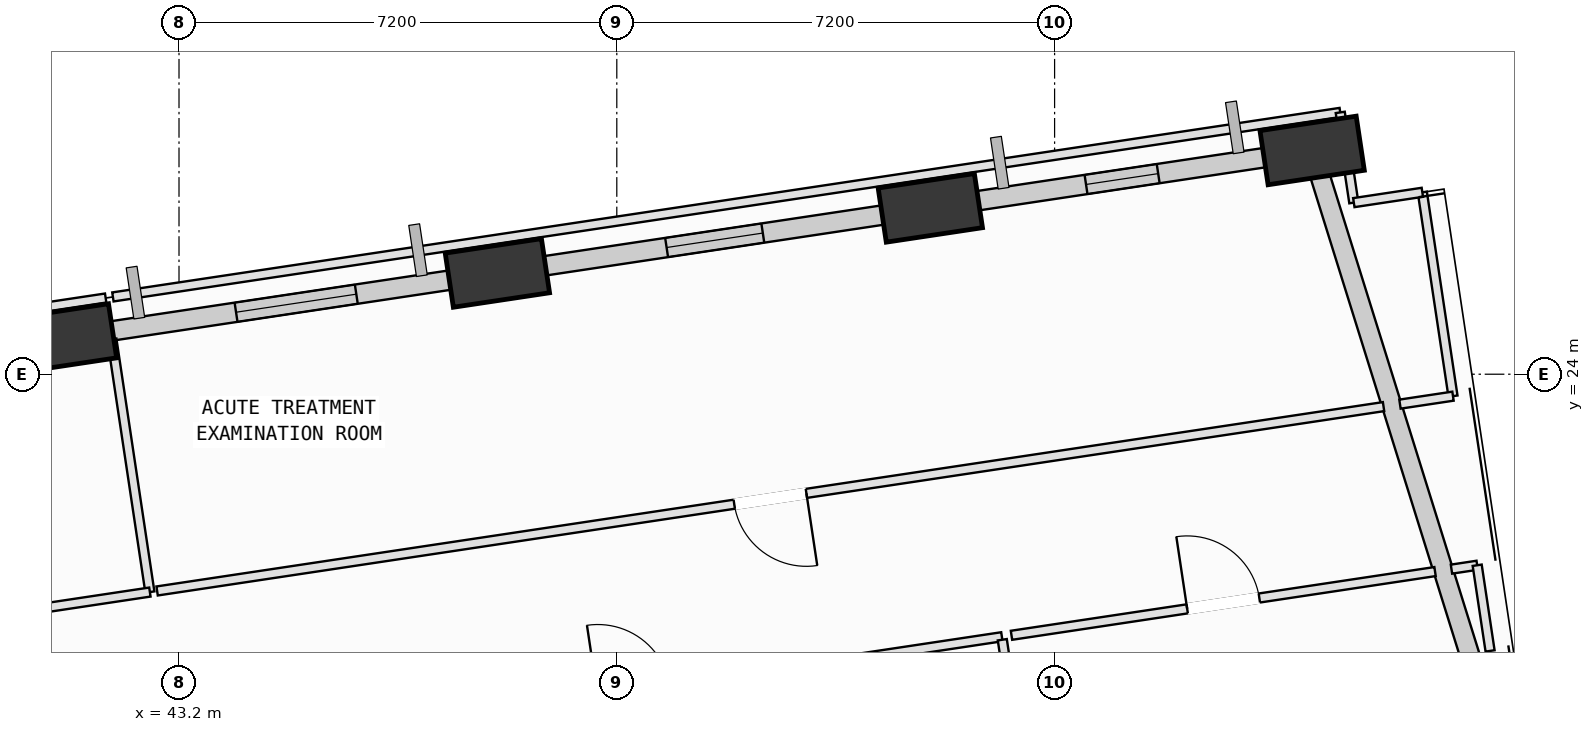
"""IFC4 building model, lengths in metres.
Left out: names, types, materials, properties, quantities, classifications, styles, units other than length and angle.
Written with IfcOpenShell. Run it as: python <this file> out.ifc"""

import sys

from ifc_helpers import new_model, si_unit, direction, frame, frame_2d, origin, origin_2d, place, context, subcontext, project, spatial, rectangle, extrude, element, fill, save


model = new_model("IFC4")
c1 = context("Model", 3, precision=1e-05, world=origin(), true_north=direction((0.0, 1.0)))
c2 = subcontext(c1, "Body", "Model", "MODEL_VIEW")
j1 = project(units=[si_unit("LENGTHUNIT", "METRE"), si_unit("PLANEANGLEUNIT", "RADIAN")], contexts=[c1])
p1 = place(None, origin())
s1 = spatial("IfcSite", under=j1, at=p1, CompositionType="ELEMENT")
p2 = place(p1, origin())
s2 = spatial("IfcBuilding", under=s1, at=p2, CompositionType="ELEMENT")
p3 = place(p2, frame((0.0, 0.0, 59.0)))
s3 = spatial("IfcBuildingStorey", under=s2, at=p3, CompositionType="ELEMENT", Elevation=59.0)
p4 = place(p3, frame((64.761, 18.311, 0.002), z_axis=(0.025557415951, 0.128271580531, 0.991409713548), x_axis=(-0.045765713476, -0.990543708864, 0.129339322325)))
e1 = element("IfcColumn", 1, at=p4, inside=s3, PredefinedType="COLUMN", context=c2, shape_type="SweptSolid", body=[
    extrude(rectangle(XDim=1.6, YDim=0.9, at=origin_2d()), origin(), (0.0, 0.0, 1.0), 4.031),
])
p5 = place(p3, frame((61.836, 27.68, 0.002), z_axis=(-0.012861832175, 0.116120503694, 0.993151852385), x_axis=(-0.966620527466, -0.255622879476, 0.017369495388)))
e2 = element("IfcColumn", 2, at=p5, inside=s3, PredefinedType="COLUMN", context=c2, shape_type="SweptSolid", body=[
    extrude(rectangle(XDim=1.6, YDim=0.9, at=origin_2d()), origin(), (0.0, 0.0, 1.0), 4.024),
])
p6 = place(p3, frame((55.556, 26.736, 0.002), z_axis=(-0.008760077746, 0.090581637247, 0.995850504861), x_axis=(-0.970042481698, -0.242558297354, 0.013529822077)))
e3 = element("IfcColumn", 3, at=p6, inside=s3, PredefinedType="COLUMN", context=c2, shape_type="SweptSolid", body=[
    extrude(rectangle(XDim=1.6, YDim=0.9, at=origin_2d()), origin(), (0.0, 0.0, 1.0), 4.013),
])
p7 = place(p3, frame((48.436, 25.666, 0.002), z_axis=(-0.004085112023, 0.061337652165, 0.998108713661), x_axis=(-0.976839538376, -0.213777892359, 0.00913942032)))
e4 = element("IfcColumn", 4, at=p7, inside=s3, PredefinedType="COLUMN", context=c2, shape_type="SweptSolid", body=[
    extrude(rectangle(XDim=1.6, YDim=0.9, at=origin_2d()), origin(), (0.0, 0.0, 1.0), 4.004),
])
p8 = place(p3, frame((41.316, 24.595, 0.002), z_axis=(0.000610560717, 0.031993381587, 0.999487894249), x_axis=(-0.991541763684, -0.129700801912, 0.00475739999)))
e5 = element("IfcColumn", 5, at=p8, inside=s3, PredefinedType="COLUMN", context=c2, shape_type="SweptSolid", body=[
    extrude(rectangle(XDim=1.6, YDim=0.9, at=origin_2d()), origin(), (0.0, 0.0, 1.0), 3.999),
])
p9 = place(p3, frame((61.948, 27.322, 0.0), z_axis=(0.0, 0.0, 1.0), x_axis=(0.298050664907, -0.954550051673, 0.0)))
e6 = element("IfcWall", 6, at=p9, inside=s3, PredefinedType="SOLIDWALL", context=c2, shape_type="SweptSolid", body=[
    extrude(rectangle(XDim=8.614, YDim=0.32, at=frame_2d((4.307, 0.0))), origin(), (0.0, 0.0, 1.0), 3.165),
])
p10 = place(p3, frame((56.139, 26.823, 0.0), z_axis=(0.0, 0.0, 1.0), x_axis=(0.988887137773, 0.148668183374, 0.0)))
e7 = element("IfcWall", 7, at=p10, inside=s3, PredefinedType="SOLIDWALL", context=c2, shape_type="SweptSolid", body=[
    extrude(rectangle(XDim=5.209, YDim=0.32, at=frame_2d((2.604, 0.0))), origin(), (0.0, 0.0, 1.0), 3.165),
])
p11 = place(p10, frame((2.0, 0.0, 0.75)))
e8 = element("IfcOpeningElement", 8, at=p11, cuts=e7, PredefinedType="OPENING", context=c2, shape_type="SweptSolid", body=[
    extrude(rectangle(XDim=1.2, YDim=1.75, at=frame_2d((0.6, 0.875))), frame((0.0, 0.17, 0.0), z_axis=(0.0, -1.0, 0.0), x_axis=(1.0, 0.0, 0.0)), (0.0, 0.0, 1.0), 0.34),
])
p12 = place(p3, frame((49.035, 25.755, 0.0), z_axis=(0.0, 0.0, 1.0), x_axis=(0.988890529399, 0.148645621746, 0.0)))
e9 = element("IfcWall", 9, at=p12, inside=s3, PredefinedType="SOLIDWALL", context=c2, shape_type="SweptSolid", body=[
    extrude(rectangle(XDim=6.024, YDim=0.32, at=frame_2d((3.012, 0.0))), origin(), (0.0, 0.0, 1.0), 3.165),
])
p13 = place(p12, frame((2.209, 0.0, 0.75)))
e10 = element("IfcOpeningElement", 10, at=p13, cuts=e9, PredefinedType="OPENING", context=c2, shape_type="SweptSolid", body=[
    extrude(rectangle(XDim=1.6, YDim=1.95, at=frame_2d((0.8, 0.975))), frame((0.0, 0.17, 0.0), z_axis=(0.0, -1.0, 0.0), x_axis=(1.0, 0.0, 0.0)), (0.0, 0.0, 1.0), 0.34),
])
p14 = place(p3, frame((41.925, 24.686, 0.0), z_axis=(0.0, 0.0, 1.0), x_axis=(0.988883458741, 0.148692652905, 0.0)))
e11 = element("IfcWall", 11, at=p14, inside=s3, PredefinedType="SOLIDWALL", context=c2, shape_type="SweptSolid", body=[
    extrude(rectangle(XDim=6.0, YDim=0.32, at=frame_2d((3.0, 0.0))), origin(), (0.0, 0.0, 1.0), 3.165),
])
p15 = place(p14, frame((2.238, 0.0, 0.75)))
e12 = element("IfcOpeningElement", 12, at=p15, cuts=e11, PredefinedType="OPENING", context=c2, shape_type="SweptSolid", body=[
    extrude(rectangle(XDim=2.0, YDim=1.95, at=frame_2d((1.0, 0.975))), frame((0.0, 0.17, 0.0), z_axis=(0.0, -1.0, 0.0), x_axis=(1.0, 0.0, 0.0)), (0.0, 0.0, 1.0), 0.34),
])
p16 = place(p3, frame((44.629, 17.863, 0.0), z_axis=(0.0, 0.0, 1.0), x_axis=(0.988897401615, 0.148599895962, 0.0)))
e13 = element("IfcWall", 13, at=p16, inside=s3, PredefinedType="PARTITIONING", context=c2, shape_type="SweptSolid", body=[
    extrude(rectangle(XDim=12.24, YDim=0.15, at=frame_2d((6.12, 0.0))), origin(), (0.0, 0.0, 1.0), 3.78),
])
p17 = place(p16, frame((5.52, 0.0, 0.0)))
e14 = element("IfcOpeningElement", 14, at=p17, cuts=e13, PredefinedType="OPENING", context=c2, shape_type="SweptSolid", body=[
    extrude(rectangle(XDim=1.2, YDim=2.15, at=frame_2d((0.6, 1.075))), frame((0.0, 0.085, 0.0), z_axis=(0.0, -1.0, 0.0), x_axis=(1.0, 0.0, 0.0)), (0.0, 0.0, 1.0), 0.17),
])
p18 = place(p3, frame((56.74, 19.633, 0.0), z_axis=(0.0, 0.0, 1.0), x_axis=(0.148699523168, -0.988882425675, 0.0)))
e15 = element("IfcWall", 15, at=p18, inside=s3, PredefinedType="PARTITIONING", context=c2, shape_type="SweptSolid", body=[
    extrude(rectangle(XDim=13.565, YDim=0.15, at=frame_2d((6.782, 0.0))), origin(), (0.0, 0.0, 1.0), 3.78),
])
p19 = place(p3, frame((56.891, 19.706, 0.0), z_axis=(0.0, 0.0, 1.0), x_axis=(0.988874237146, 0.14875396838, 0.0)))
e16 = element("IfcWall", 16, at=p19, inside=s3, PredefinedType="PARTITIONING", context=c2, shape_type="SweptSolid", body=[
    extrude(rectangle(XDim=7.044, YDim=0.15, at=frame_2d((3.522, 0.0))), origin(), (0.0, 0.0, 1.0), 3.78),
])
p20 = place(p19, frame((2.922, 0.0, 0.0)))
e17 = element("IfcOpeningElement", 17, at=p20, cuts=e16, PredefinedType="OPENING", context=c2, shape_type="SweptSolid", body=[
    extrude(rectangle(XDim=1.2, YDim=2.15, at=frame_2d((0.6, 1.075))), frame((0.0, 0.085, 0.0), z_axis=(0.0, -1.0, 0.0), x_axis=(1.0, 0.0, 0.0)), (0.0, 0.0, 1.0), 0.17),
])
p21 = place(p3, frame((64.127, 20.794, 0.0), z_axis=(0.0, 0.0, 1.0), x_axis=(0.988764107643, 0.149484244779, 0.0)))
e18 = element("IfcWall", 18, at=p21, inside=s3, PredefinedType="PARTITIONING", context=c2, shape_type="SweptSolid", body=[
    extrude(rectangle(XDim=0.428, YDim=0.15, at=frame_2d((0.214, 0.0))), origin(), (0.0, 0.0, 1.0), 3.78),
])
p22 = place(p3, frame((64.55, 20.858, 0.0), z_axis=(0.0, 0.0, 1.0), x_axis=(0.148734259416, -0.988877201717, 0.0)))
e19 = element("IfcWall", 19, at=p22, inside=s3, PredefinedType="PARTITIONING", context=c2, shape_type="SweptSolid", body=[
    extrude(rectangle(XDim=1.425, YDim=0.15, at=frame_2d((0.712, 0.0))), origin(), (0.0, 0.0, 1.0), 3.165),
])
p23 = place(p3, frame((42.096, 24.576, 0.0), z_axis=(0.0, 0.0, 1.0), x_axis=(0.148610121191, -0.988895865033, 0.0)))
e20 = element("IfcWall", 20, at=p23, inside=s3, PredefinedType="PARTITIONING", context=c2, shape_type="SweptSolid", body=[
    extrude(rectangle(XDim=4.206, YDim=0.15, at=frame_2d((2.103, 0.0))), origin(), (0.0, 0.0, 1.0), 3.78),
])
p24 = place(p3, frame((42.721, 20.417, 0.0), z_axis=(0.0, 0.0, 1.0), x_axis=(-0.988891762051, -0.148637421089, 0.0)))
e21 = element("IfcWall", 21, at=p24, inside=s3, PredefinedType="PARTITIONING", context=c2, shape_type="SweptSolid", body=[
    extrude(rectangle(XDim=4.744, YDim=0.15, at=frame_2d((2.372, 0.0))), origin(), (0.0, 0.0, 1.0), 3.78),
])
p25 = place(p3, frame((27.786, 23.117, 0.0), z_axis=(0.0, 0.0, 1.0), x_axis=(0.988887440996, 0.148666166425, 0.0)))
e22 = element("IfcWall", 22, at=p25, inside=s3, PredefinedType="PARTITIONING", context=c2, shape_type="SweptSolid", body=[
    extrude(rectangle(XDim=14.368, YDim=0.15, at=frame_2d((7.184, 0.0))), origin(), (0.0, 0.0, 1.0), 3.165),
])
p26 = place(p3, frame((63.648, 26.992, 0.0), z_axis=(0.0, 0.0, 1.0), x_axis=(0.148685493324, -0.988884535259, 0.0)))
e23 = element("IfcWall", 23, at=p26, inside=s3, PredefinedType="PARTITIONING", context=c2, shape_type="SweptSolid", body=[
    extrude(rectangle(XDim=3.391, YDim=0.15, at=frame_2d((1.695, 0.0))), origin(), (0.0, 0.0, 1.0), 3.78),
])
p27 = place(p3, frame((64.152, 23.639, 0.0), z_axis=(0.0, 0.0, 1.0), x_axis=(-0.988928228483, -0.148394605394, 0.0)))
e24 = element("IfcWall", 24, at=p27, inside=s3, PredefinedType="PARTITIONING", context=c2, shape_type="SweptSolid", body=[
    extrude(rectangle(XDim=0.882, YDim=0.15, at=frame_2d((0.441, 0.0))), origin(), (0.0, 0.0, 1.0), 3.78),
])
p28 = place(p3, frame((63.01, 23.467, 0.0), z_axis=(0.0, 0.0, 1.0), x_axis=(-0.988889595635, -0.148651833642, 0.0)))
e25 = element("IfcWall", 25, at=p28, inside=s3, PredefinedType="PARTITIONING", context=c2, shape_type="SweptSolid", body=[
    extrude(rectangle(XDim=20.396, YDim=0.15, at=frame_2d((10.198, 0.0))), origin(), (0.0, 0.0, 1.0), 3.78),
])
p29 = place(p28, frame((9.598, 0.0, 0.0)))
e26 = element("IfcOpeningElement", 26, at=p29, cuts=e25, PredefinedType="OPENING", context=c2, shape_type="SweptSolid", body=[
    extrude(rectangle(XDim=1.2, YDim=2.15, at=frame_2d((0.6, 1.075))), frame((0.0, 0.085, 0.0), z_axis=(0.0, -1.0, 0.0), x_axis=(1.0, 0.0, 0.0)), (0.0, 0.0, 1.0), 0.17),
])
p30 = place(p3, frame((42.113, 25.271, 0.0), z_axis=(0.0, 0.0, 1.0), x_axis=(0.988884883035, 0.148683180302, 0.0)))
e27 = element("IfcWall", 27, at=p30, inside=s3, PredefinedType="PARTITIONING", context=c2, shape_type="SweptSolid", body=[
    extrude(rectangle(XDim=20.412, YDim=0.15, at=frame_2d((10.206, 0.0))), origin(), (0.0, 0.0, 1.0), 3.165),
])
p31 = place(p3, frame((62.298, 28.306, 0.0), z_axis=(0.0, 0.0, 1.0), x_axis=(0.148547308506, -0.98890530241, 0.0)))
e28 = element("IfcWall", 28, at=p31, inside=s3, PredefinedType="PARTITIONING", context=c2, shape_type="SweptSolid", body=[
    extrude(rectangle(XDim=1.5, YDim=0.15, at=frame_2d((0.75, 0.0))), origin(), (0.0, 0.0, 1.0), 3.165),
])
p32 = place(p3, frame((62.521, 26.822, 0.0), z_axis=(0.0, 0.0, 1.0), x_axis=(0.988822933867, 0.149094619145, 0.0)))
e29 = element("IfcWall", 29, at=p32, inside=s3, PredefinedType="PARTITIONING", context=c2, shape_type="SweptSolid", body=[
    extrude(rectangle(XDim=1.14, YDim=0.15, at=frame_2d((0.57, 0.0))), origin(), (0.0, 0.0, 1.0), 3.78),
])
p33 = place(p11, origin())
e30 = element("IfcWindow", 30, at=p33, inside=s3, PartitioningType="SINGLE_PANEL", PredefinedType="WINDOW", context=c2, shape_type="SweptSolid", body=[
    extrude(rectangle(XDim=1.2, YDim=1.75, at=frame_2d((0.6, 0.875))), frame((0.0, 0.03, 0.0), z_axis=(0.0, -1.0, 0.0), x_axis=(1.0, 0.0, 0.0)), (0.0, 0.0, 1.0), 0.06),
])
fill(e8, e30)
p34 = place(p13, origin())
e31 = element("IfcWindow", 31, at=p34, inside=s3, PartitioningType="SINGLE_PANEL", PredefinedType="WINDOW", context=c2, shape_type="SweptSolid", body=[
    extrude(rectangle(XDim=1.6, YDim=1.95, at=frame_2d((0.8, 0.975))), frame((0.0, 0.03, 0.0), z_axis=(0.0, -1.0, 0.0), x_axis=(1.0, 0.0, 0.0)), (0.0, 0.0, 1.0), 0.06),
])
fill(e10, e31)
p35 = place(p15, origin())
e32 = element("IfcWindow", 32, at=p35, inside=s3, PartitioningType="SINGLE_PANEL", PredefinedType="WINDOW", context=c2, shape_type="SweptSolid", body=[
    extrude(rectangle(XDim=2.0, YDim=1.95, at=frame_2d((1.0, 0.975))), frame((0.0, 0.03, 0.0), z_axis=(0.0, -1.0, 0.0), x_axis=(1.0, 0.0, 0.0)), (0.0, 0.0, 1.0), 0.06),
])
fill(e12, e32)
p36 = place(p20, origin())
e33 = element("IfcDoor", 33, at=p36, inside=s3, OperationType="SINGLE_SWING_LEFT", PredefinedType="DOOR", context=c2, shape_type="SweptSolid", body=[
    extrude(rectangle(XDim=1.2, YDim=2.15, at=frame_2d((0.6, 1.075))), frame((0.0, 0.025, 0.0), z_axis=(0.0, -1.0, 0.0), x_axis=(1.0, 0.0, 0.0)), (0.0, 0.0, 1.0), 0.05),
])
fill(e17, e33)
p37 = place(p29, origin())
e34 = element("IfcDoor", 34, at=p37, inside=s3, OperationType="SINGLE_SWING_LEFT", PredefinedType="DOOR", context=c2, shape_type="SweptSolid", body=[
    extrude(rectangle(XDim=1.2, YDim=2.15, at=frame_2d((0.6, 1.075))), frame((0.0, 0.025, 0.0), z_axis=(0.0, -1.0, 0.0), x_axis=(1.0, 0.0, 0.0)), (0.0, 0.0, 1.0), 0.05),
])
fill(e26, e34)
save(model, sys.argv[1])
